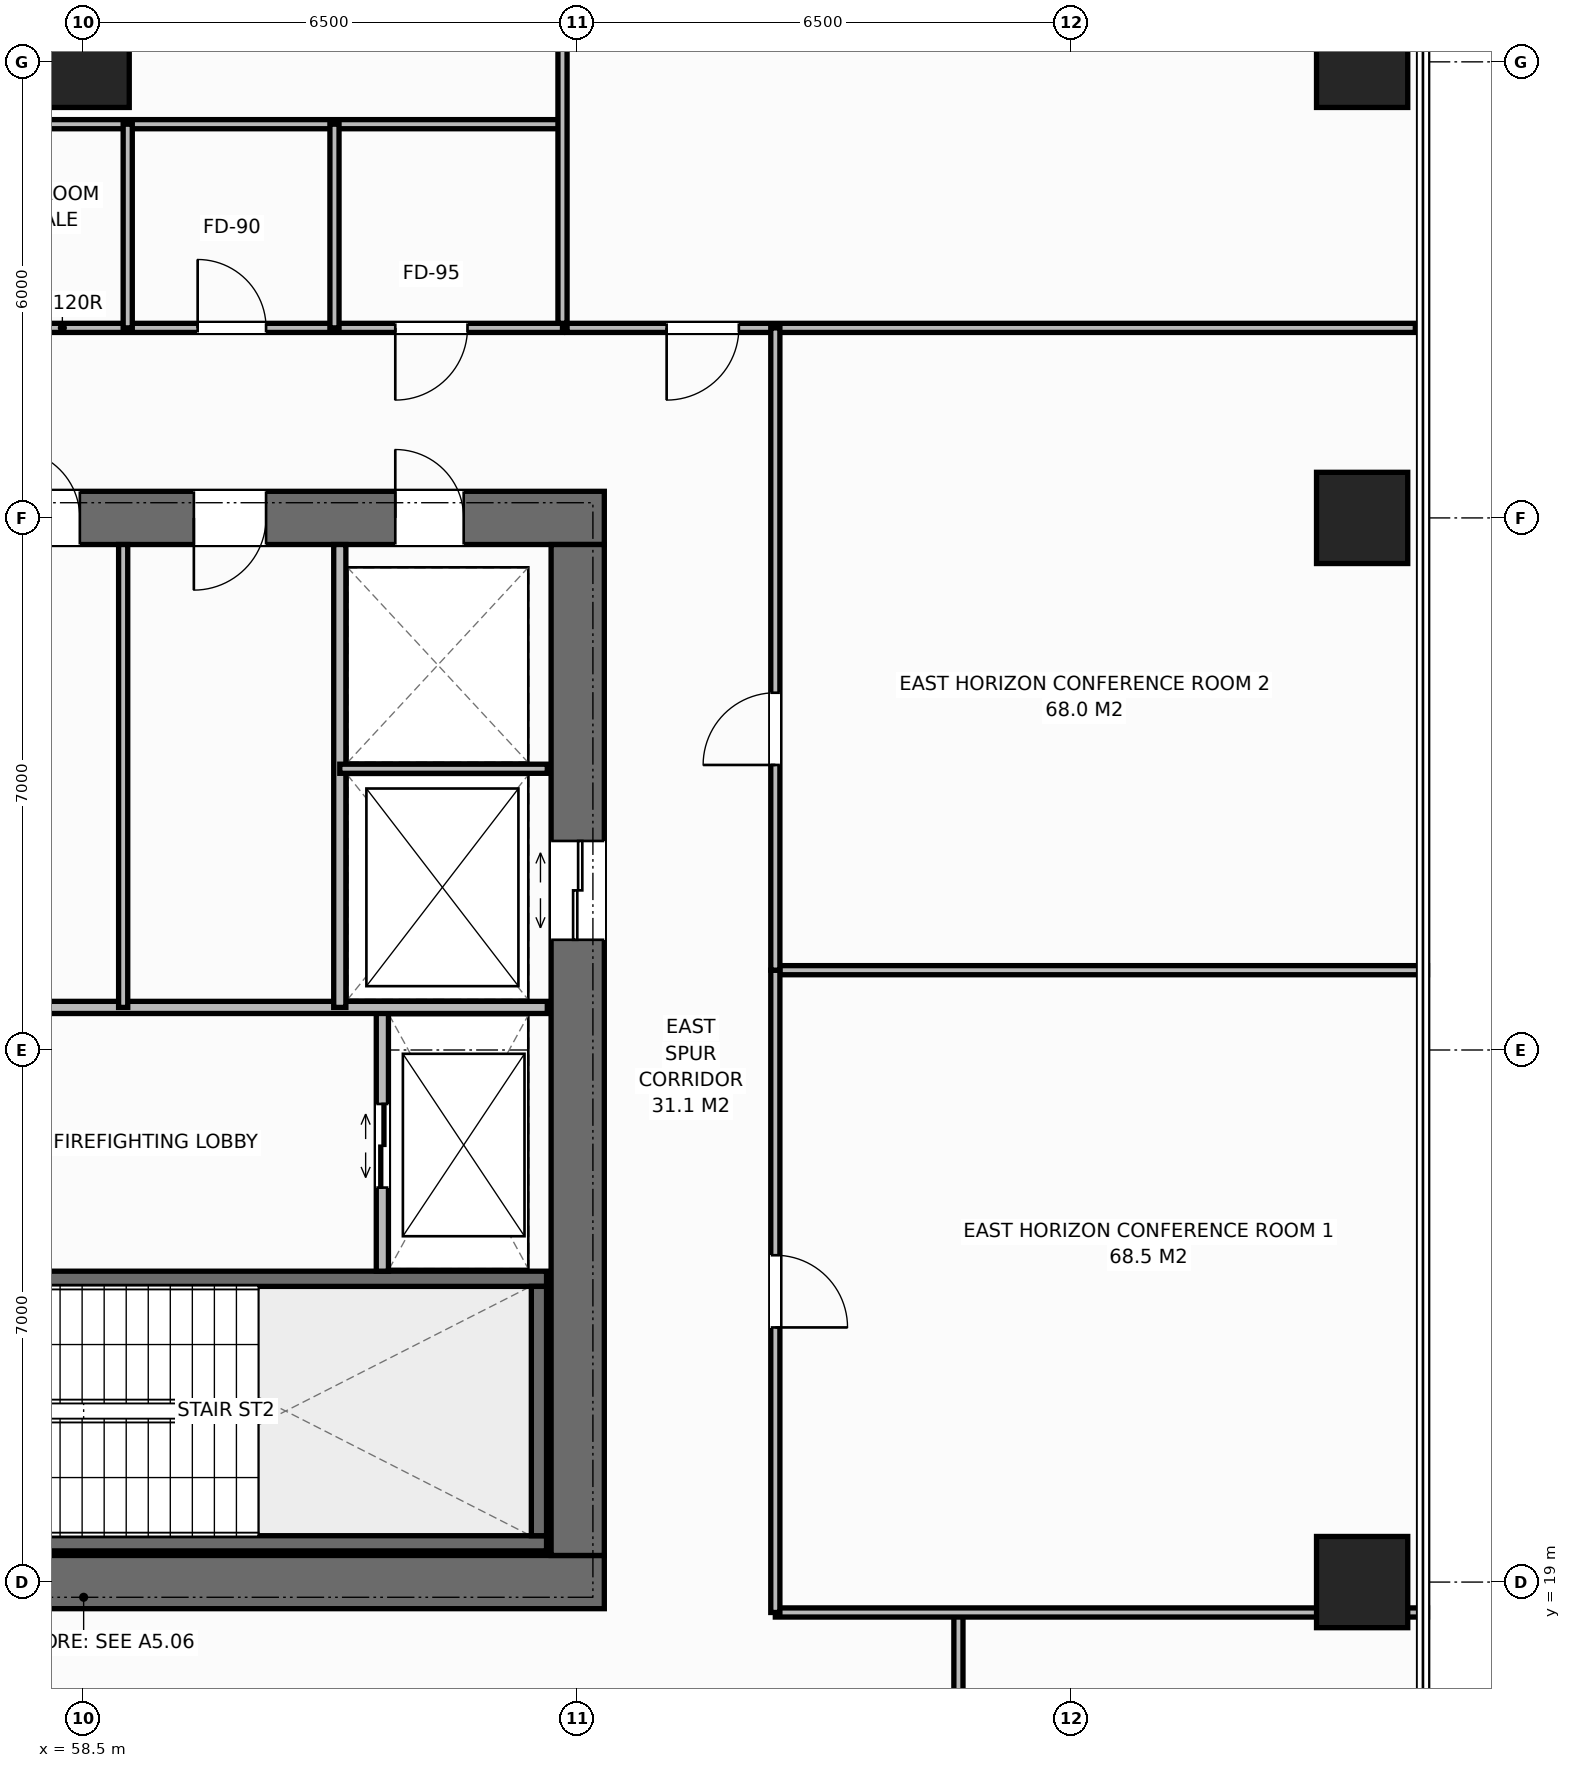
"""IFC4 building model, lengths in metres.
Left out: names, types, materials, properties, quantities, classifications, styles, units other than length and angle.
Written with IfcOpenShell. Run it as: python <this file> out.ifc"""

import sys

from ifc_helpers import new_model, si_unit, direction, frame, frame_2d, origin, origin_2d, place, context, subcontext, project, spatial, rectangle, extrude, element, fill, save


model = new_model("IFC4")
c1 = context("Model", 3, precision=1e-05, world=origin(), true_north=direction((0.0, 1.0)))
c2 = subcontext(c1, "Body", "Model", "MODEL_VIEW")
j1 = project(units=[si_unit("LENGTHUNIT", "METRE"), si_unit("PLANEANGLEUNIT", "RADIAN")], contexts=[c1])
p1 = place(None, origin())
s1 = spatial("IfcSite", under=j1, at=p1, CompositionType="ELEMENT")
p2 = place(p1, origin())
s2 = spatial("IfcBuilding", under=s1, at=p2, CompositionType="ELEMENT")
p3 = place(p2, frame((0.0, 0.0, 135.4)))
s3 = spatial("IfcBuildingStorey", under=s2, at=p3, CompositionType="ELEMENT", Elevation=135.4)
p4 = place(p3, frame((51.65, 19.0, 0.0), z_axis=(0.0, 0.0, 1.0), x_axis=(1.0, 0.0, 0.0)))
e1 = element("IfcWall", 1, at=p4, inside=s3, PredefinedType="SHEAR", context=c2, shape_type="SweptSolid", body=[
    extrude(rectangle(XDim=13.7, YDim=0.7, at=frame_2d((6.85, 0.0))), origin(), (0.0, 0.0, 1.0), 3.8),
])
p5 = place(p4, frame((3.07, 0.0, 0.0)))
e2 = element("IfcOpeningElement", 2, at=p5, cuts=e1, PredefinedType="OPENING", context=c2, shape_type="SweptSolid", body=[
    extrude(rectangle(XDim=1.4, YDim=2.2, at=frame_2d((0.7, 1.1))), frame((0.0, 0.36, 0.0), z_axis=(0.0, -1.0, 0.0), x_axis=(1.0, 0.0, 0.0)), (0.0, 0.0, 1.0), 0.72),
])
p6 = place(p3, frame((51.65, 33.0, 0.0), z_axis=(0.0, 0.0, 1.0), x_axis=(1.0, 0.0, 0.0)))
e3 = element("IfcWall", 3, at=p6, inside=s3, PredefinedType="SHEAR", context=c2, shape_type="SweptSolid", body=[
    extrude(rectangle(XDim=13.7, YDim=0.7, at=frame_2d((6.85, 0.0))), origin(), (0.0, 0.0, 1.0), 3.8),
])
p7 = place(p6, frame((3.07, 0.0, 0.0)))
e4 = element("IfcOpeningElement", 4, at=p7, cuts=e3, PredefinedType="OPENING", context=c2, shape_type="SweptSolid", body=[
    extrude(rectangle(XDim=1.4, YDim=2.2, at=frame_2d((0.7, 1.1))), frame((0.0, 0.36, 0.0), z_axis=(0.0, -1.0, 0.0), x_axis=(1.0, 0.0, 0.0)), (0.0, 0.0, 1.0), 0.72),
])
p8 = place(p6, frame((10.95, 0.0, 0.0)))
e5 = element("IfcOpeningElement", 5, at=p8, cuts=e3, PredefinedType="OPENING", context=c2, shape_type="SweptSolid", body=[
    extrude(rectangle(XDim=0.9, YDim=2.15, at=frame_2d((0.45, 1.075))), frame((0.0, 0.36, 0.0), z_axis=(0.0, -1.0, 0.0), x_axis=(1.0, 0.0, 0.0)), (0.0, 0.0, 1.0), 0.72),
])
p9 = place(p6, frame((5.9, 0.0, 0.0)))
e6 = element("IfcOpeningElement", 6, at=p9, cuts=e3, PredefinedType="OPENING", context=c2, shape_type="SweptSolid", body=[
    extrude(rectangle(XDim=0.9, YDim=2.15, at=frame_2d((0.45, 1.075))), frame((0.0, 0.36, 0.0), z_axis=(0.0, -1.0, 0.0), x_axis=(1.0, 0.0, 0.0)), (0.0, 0.0, 1.0), 0.72),
])
p10 = place(p6, frame((8.3, 0.0, 0.0)))
e7 = element("IfcOpeningElement", 7, at=p10, cuts=e3, PredefinedType="OPENING", context=c2, shape_type="SweptSolid", body=[
    extrude(rectangle(XDim=0.95, YDim=2.15, at=frame_2d((0.475, 1.075))), frame((0.0, 0.36, 0.0), z_axis=(0.0, -1.0, 0.0), x_axis=(1.0, 0.0, 0.0)), (0.0, 0.0, 1.0), 0.72),
])
p11 = place(p3, frame((65.0, 19.35, 0.0), z_axis=(0.0, 0.0, 1.0), x_axis=(0.0, 1.0, 0.0)))
e8 = element("IfcWall", 8, at=p11, inside=s3, PredefinedType="SHEAR", context=c2, shape_type="SweptSolid", body=[
    extrude(rectangle(XDim=13.3, YDim=0.7, at=frame_2d((6.65, 0.0))), origin(), (0.0, 0.0, 1.0), 3.8),
])
p12 = place(p11, frame((8.1, 0.0, 0.0)))
e9 = element("IfcOpeningElement", 9, at=p12, cuts=e8, PredefinedType="OPENING", context=c2, shape_type="SweptSolid", body=[
    extrude(rectangle(XDim=1.3, YDim=2.2, at=frame_2d((0.65, 1.1))), frame((0.0, 0.36, 0.0), z_axis=(0.0, -1.0, 0.0), x_axis=(1.0, 0.0, 0.0)), (0.0, 0.0, 1.0), 0.72),
])
p13 = place(p3, frame((56.16, 19.51, 0.0), z_axis=(0.0, 0.0, 1.0), x_axis=(1.0, 0.0, 0.0)))
e10 = element("IfcWall", 10, at=p13, inside=s3, PredefinedType="SHEAR", context=c2, shape_type="SweptSolid", body=[
    extrude(rectangle(XDim=8.43, YDim=0.2, at=frame_2d((4.215, 0.0))), origin(), (0.0, 0.0, 1.0), 3.8),
])
p14 = place(p3, frame((56.16, 22.99, 0.0), z_axis=(0.0, 0.0, 1.0), x_axis=(1.0, 0.0, 0.0)))
e11 = element("IfcWall", 11, at=p14, inside=s3, PredefinedType="SHEAR", context=c2, shape_type="SweptSolid", body=[
    extrude(rectangle(XDim=8.43, YDim=0.2, at=frame_2d((4.215, 0.0))), origin(), (0.0, 0.0, 1.0), 3.8),
])
p15 = place(p14, frame((0.45, 0.0, 0.0)))
e12 = element("IfcOpeningElement", 12, at=p15, cuts=e11, PredefinedType="OPENING", context=c2, shape_type="SweptSolid", body=[
    extrude(rectangle(XDim=1.0, YDim=2.15, at=frame_2d((0.5, 1.075))), frame((0.0, 0.11, 0.0), z_axis=(0.0, -1.0, 0.0), x_axis=(1.0, 0.0, 0.0)), (0.0, 0.0, 1.0), 0.22),
])
p16 = place(p3, frame((64.49, 19.61, 0.0), z_axis=(0.0, 0.0, 1.0), x_axis=(0.0, 1.0, 0.0)))
e13 = element("IfcWall", 13, at=p16, inside=s3, PredefinedType="SHEAR", context=c2, shape_type="SweptSolid", body=[
    extrude(rectangle(XDim=3.28, YDim=0.2, at=frame_2d((1.64, 0.0))), origin(), (0.0, 0.0, 1.0), 3.8),
])
for number, where, z_axis, x_axis in (
    (14, (58.5, 39.0, 0.0), (0.0, 0.0, 1.0), (1.0, 0.0, 0.0)),
    (15, (75.32, 19.0, 0.0), (0.0, 0.0, 1.0), (1.0, 0.0, 0.0)),
    (16, (75.32, 33.0, 0.0), (0.0, 0.0, 1.0), (1.0, 0.0, 0.0)),
    (17, (75.32, 39.0, 0.0), (0.0, 0.0, 1.0), (1.0, 0.0, 0.0)),
):
    element("IfcColumn", number, at=place(p3, frame(where, z_axis=z_axis, x_axis=x_axis)), inside=s3, PredefinedType="COLUMN", context=c2, shape_type="SweptSolid", body=[
        extrude(rectangle(XDim=1.2, YDim=1.2, at=origin_2d()), origin(), (0.0, 0.0, 1.0), 3.8),
    ])
p17 = place(p3, frame((62.43, 23.09, 0.0), z_axis=(0.0, 0.0, 1.0), x_axis=(0.0, 1.0, 0.0)))
e18 = element("IfcWall", 18, at=p17, inside=s3, PredefinedType="STANDARD", context=c2, shape_type="SweptSolid", body=[
    extrude(rectangle(XDim=3.47, YDim=0.16, at=frame_2d((1.735, 0.0))), origin(), (0.0, 0.0, 1.0), 3.52),
])
p18 = place(p17, frame((1.1, 0.0, 0.0)))
e19 = element("IfcOpeningElement", 19, at=p18, cuts=e18, PredefinedType="OPENING", context=c2, shape_type="SweptSolid", body=[
    extrude(rectangle(XDim=1.1, YDim=2.2, at=frame_2d((0.55, 1.1))), frame((0.0, 0.09, 0.0), z_axis=(0.0, -1.0, 0.0), x_axis=(1.0, 0.0, 0.0)), (0.0, 0.0, 1.0), 0.18),
])
p19 = place(p3, frame((56.26, 26.56, 0.0), z_axis=(0.0, 0.0, 1.0), x_axis=(1.0, 0.0, 0.0)))
e20 = element("IfcWall", 20, at=p19, inside=s3, PredefinedType="STANDARD", context=c2, shape_type="SweptSolid", body=[
    extrude(rectangle(XDim=8.34, YDim=0.16, at=frame_2d((4.17, 0.0))), origin(), (0.0, 0.0, 1.0), 3.52),
])
p20 = place(p3, frame((61.87, 26.56, 0.0), z_axis=(0.0, 0.0, 1.0), x_axis=(0.0, 1.0, 0.0)))
e21 = element("IfcWall", 21, at=p20, inside=s3, PredefinedType="STANDARD", context=c2, shape_type="SweptSolid", body=[
    extrude(rectangle(XDim=6.09, YDim=0.16, at=frame_2d((3.045, 0.0))), origin(), (0.0, 0.0, 1.0), 3.52),
])
p21 = place(p3, frame((61.87, 29.7, 0.0), z_axis=(0.0, 0.0, 1.0), x_axis=(1.0, 0.0, 0.0)))
e22 = element("IfcWall", 22, at=p21, inside=s3, PredefinedType="PARTITIONING", context=c2, shape_type="SweptSolid", body=[
    extrude(rectangle(XDim=2.73, YDim=0.12, at=frame_2d((1.365, 0.0))), origin(), (0.0, 0.0, 1.0), 3.52),
])
p22 = place(p3, frame((59.02, 26.56, 0.0), z_axis=(0.0, 0.0, 1.0), x_axis=(0.0, 1.0, 0.0)))
e23 = element("IfcWall", 23, at=p22, inside=s3, PredefinedType="PARTITIONING", context=c2, shape_type="SweptSolid", body=[
    extrude(rectangle(XDim=6.09, YDim=0.12, at=frame_2d((3.045, 0.0))), origin(), (0.0, 0.0, 1.0), 3.52),
])
p23 = place(p3, frame((70.009, 16.5, 0.0), z_axis=(0.0, 0.0, 1.0), x_axis=(0.0, 1.0, 0.0)))
e24 = element("IfcWall", 24, at=p23, inside=s3, PredefinedType="PARTITIONING", context=c2, shape_type="SweptSolid", body=[
    extrude(rectangle(XDim=2.1, YDim=0.12, at=frame_2d((1.05, 0.0))), origin(), (0.0, 0.0, 1.0), 3.52),
])
p24 = place(p3, frame((51.64, 35.5, 0.0), z_axis=(0.0, 0.0, 1.0), x_axis=(1.0, 0.0, 0.0)))
e25 = element("IfcWall", 25, at=p24, inside=s3, PredefinedType="PARTITIONING", context=c2, shape_type="SweptSolid", body=[
    extrude(rectangle(XDim=13.16, YDim=0.12, at=frame_2d((6.58, 0.0))), origin(), (0.0, 0.0, 1.0), 3.52),
])
p25 = place(p24, frame((1.51, 0.0, 0.0)))
e26 = element("IfcOpeningElement", 26, at=p25, cuts=e25, PredefinedType="OPENING", context=c2, shape_type="SweptSolid", body=[
    extrude(rectangle(XDim=0.9, YDim=2.15, at=frame_2d((0.45, 1.075))), frame((0.0, 0.07, 0.0), z_axis=(0.0, -1.0, 0.0), x_axis=(1.0, 0.0, 0.0)), (0.0, 0.0, 1.0), 0.14),
])
p26 = place(p24, frame((4.51, 0.0, 0.0)))
e27 = element("IfcOpeningElement", 27, at=p26, cuts=e25, PredefinedType="OPENING", context=c2, shape_type="SweptSolid", body=[
    extrude(rectangle(XDim=0.9, YDim=2.15, at=frame_2d((0.45, 1.075))), frame((0.0, 0.07, 0.0), z_axis=(0.0, -1.0, 0.0), x_axis=(1.0, 0.0, 0.0)), (0.0, 0.0, 1.0), 0.14),
])
p27 = place(p24, frame((8.36, 0.0, 0.0)))
e28 = element("IfcOpeningElement", 28, at=p27, cuts=e25, PredefinedType="OPENING", context=c2, shape_type="SweptSolid", body=[
    extrude(rectangle(XDim=0.9, YDim=2.15, at=frame_2d((0.45, 1.075))), frame((0.0, 0.07, 0.0), z_axis=(0.0, -1.0, 0.0), x_axis=(1.0, 0.0, 0.0)), (0.0, 0.0, 1.0), 0.14),
])
p28 = place(p24, frame((10.96, 0.0, 0.0)))
e29 = element("IfcOpeningElement", 29, at=p28, cuts=e25, PredefinedType="OPENING", context=c2, shape_type="SweptSolid", body=[
    extrude(rectangle(XDim=0.95, YDim=2.15, at=frame_2d((0.475, 1.075))), frame((0.0, 0.07, 0.0), z_axis=(0.0, -1.0, 0.0), x_axis=(1.0, 0.0, 0.0)), (0.0, 0.0, 1.0), 0.14),
])
p29 = place(p3, frame((51.64, 38.18, 0.0), z_axis=(0.0, 0.0, 1.0), x_axis=(1.0, 0.0, 0.0)))
e30 = element("IfcWall", 30, at=p29, inside=s3, PredefinedType="PARTITIONING", context=c2, shape_type="SweptSolid", body=[
    extrude(rectangle(XDim=13.16, YDim=0.12, at=frame_2d((6.58, 0.0))), origin(), (0.0, 0.0, 1.0), 3.52),
])
for number, where, z_axis, x_axis in (
    (31, (59.08, 35.5, 0.0), (0.0, 0.0, 1.0), (0.0, 1.0, 0.0)),
    (32, (61.8, 35.5, 0.0), (0.0, 0.0, 1.0), (0.0, 1.0, 0.0)),
):
    element("IfcWall", number, at=place(p3, frame(where, z_axis=z_axis, x_axis=x_axis)), inside=s3, PredefinedType="PARTITIONING", context=c2, shape_type="SweptSolid", body=[
        extrude(rectangle(XDim=2.68, YDim=0.12, at=frame_2d((1.34, 0.0))), origin(), (0.0, 0.0, 1.0), 3.52),
    ])
p30 = place(p3, frame((64.8, 35.56, 0.0), z_axis=(0.0, 0.0, 1.0), x_axis=(0.0, 1.0, 0.0)))
e33 = element("IfcWall", 33, at=p30, inside=s3, PredefinedType="PARTITIONING", context=c2, shape_type="SweptSolid", body=[
    extrude(rectangle(XDim=14.72, YDim=0.12, at=frame_2d((7.36, 0.0))), origin(), (0.0, 0.0, 1.0), 2.72),
])
p31 = place(p3, frame((64.86, 35.5, 0.0), z_axis=(0.0, 0.0, 1.0), x_axis=(1.0, 0.0, 0.0)))
e34 = element("IfcWall", 34, at=p31, inside=s3, PredefinedType="PARTITIONING", context=c2, shape_type="SweptSolid", body=[
    extrude(rectangle(XDim=11.16, YDim=0.12, at=frame_2d((5.58, 0.0))), origin(), (0.0, 0.0, 1.0), 3.52),
])
p32 = place(p31, frame((1.31, 0.0, 0.0)))
e35 = element("IfcOpeningElement", 35, at=p32, cuts=e34, PredefinedType="OPENING", context=c2, shape_type="SweptSolid", body=[
    extrude(rectangle(XDim=0.95, YDim=2.15, at=frame_2d((0.475, 1.075))), frame((0.0, 0.07, 0.0), z_axis=(0.0, -1.0, 0.0), x_axis=(1.0, 0.0, 0.0)), (0.0, 0.0, 1.0), 0.14),
])
for number, where, z_axis, x_axis in (
    (36, (67.6, 18.6, 0.0), (0.0, 0.0, 1.0), (1.0, 0.0, 0.0)),
    (37, (67.6, 27.05, 0.0), (0.0, 0.0, 1.0), (1.0, 0.0, 0.0)),
):
    element("IfcWall", number, at=place(p3, frame(where, z_axis=z_axis, x_axis=x_axis)), inside=s3, PredefinedType="PARTITIONING", context=c2, shape_type="SweptSolid", body=[
        extrude(rectangle(XDim=8.58, YDim=0.12, at=frame_2d((4.29, 0.0))), origin(), (0.0, 0.0, 1.0), 3.52),
    ])
p33 = place(p3, frame((67.6, 18.6, 0.0), z_axis=(0.0, 0.0, 1.0), x_axis=(0.0, 1.0, 0.0)))
e38 = element("IfcWall", 38, at=p33, inside=s3, PredefinedType="PARTITIONING", context=c2, shape_type="SweptSolid", body=[
    extrude(rectangle(XDim=8.45, YDim=0.12, at=frame_2d((4.225, 0.0))), origin(), (0.0, 0.0, 1.0), 3.52),
])
p34 = place(p33, frame((3.75, 0.0, 0.0)))
e39 = element("IfcOpeningElement", 39, at=p34, cuts=e38, PredefinedType="OPENING", context=c2, shape_type="SweptSolid", body=[
    extrude(rectangle(XDim=0.95, YDim=2.15, at=frame_2d((0.475, 1.075))), frame((0.0, 0.07, 0.0), z_axis=(0.0, -1.0, 0.0), x_axis=(1.0, 0.0, 0.0)), (0.0, 0.0, 1.0), 0.14),
])
p35 = place(p3, frame((67.6, 27.05, 0.0), z_axis=(0.0, 0.0, 1.0), x_axis=(0.0, 1.0, 0.0)))
e40 = element("IfcWall", 40, at=p35, inside=s3, PredefinedType="PARTITIONING", context=c2, shape_type="SweptSolid", body=[
    extrude(rectangle(XDim=8.45, YDim=0.12, at=frame_2d((4.225, 0.0))), origin(), (0.0, 0.0, 1.0), 3.52),
])
p36 = place(p35, frame((2.7, 0.0, 0.0)))
e41 = element("IfcOpeningElement", 41, at=p36, cuts=e40, PredefinedType="OPENING", context=c2, shape_type="SweptSolid", body=[
    extrude(rectangle(XDim=0.95, YDim=2.15, at=frame_2d((0.475, 1.075))), frame((0.0, 0.07, 0.0), z_axis=(0.0, -1.0, 0.0), x_axis=(1.0, 0.0, 0.0)), (0.0, 0.0, 1.0), 0.14),
])
p37 = place(p18, origin())
e42 = element("IfcDoor", 42, at=p37, inside=s3, OperationType="DOUBLE_DOOR_SLIDING", PredefinedType="DOOR", context=c2, shape_type="SweptSolid", body=[
    extrude(rectangle(XDim=1.1, YDim=2.2, at=frame_2d((0.55, 1.1))), frame((0.0, 0.025, 0.0), z_axis=(0.0, -1.0, 0.0), x_axis=(1.0, 0.0, 0.0)), (0.0, 0.0, 1.0), 0.05),
])
fill(e19, e42)
p38 = place(p12, origin())
e43 = element("IfcDoor", 43, at=p38, inside=s3, OperationType="DOUBLE_DOOR_SLIDING", PredefinedType="DOOR", context=c2, shape_type="SweptSolid", body=[
    extrude(rectangle(XDim=1.3, YDim=2.2, at=frame_2d((0.65, 1.1))), frame((0.0, 0.025, 0.0), z_axis=(0.0, -1.0, 0.0), x_axis=(1.0, 0.0, 0.0)), (0.0, 0.0, 1.0), 0.05),
])
fill(e9, e43)
p39 = place(p8, origin())
e44 = element("IfcDoor", 44, at=p39, inside=s3, OperationType="SINGLE_SWING_LEFT", PredefinedType="DOOR", context=c2, shape_type="SweptSolid", body=[
    extrude(rectangle(XDim=0.9, YDim=2.15, at=frame_2d((0.45, 1.075))), frame((0.0, -0.075, 0.0), z_axis=(0.0, -1.0, 0.0), x_axis=(1.0, 0.0, 0.0)), (0.0, 0.0, 1.0), 0.05),
])
fill(e5, e44)
p40 = place(p9, origin())
e45 = element("IfcDoor", 45, at=p40, inside=s3, OperationType="SINGLE_SWING_LEFT", PredefinedType="DOOR", context=c2, shape_type="SweptSolid", body=[
    extrude(rectangle(XDim=0.9, YDim=2.15, at=frame_2d((0.45, 1.075))), frame((0.0, -0.075, 0.0), z_axis=(0.0, -1.0, 0.0), x_axis=(1.0, 0.0, 0.0)), (0.0, 0.0, 1.0), 0.05),
])
fill(e6, e45)
p41 = place(p10, origin())
e46 = element("IfcDoor", 46, at=p41, inside=s3, OperationType="SINGLE_SWING_RIGHT", PredefinedType="DOOR", context=c2, shape_type="SweptSolid", body=[
    extrude(rectangle(XDim=0.95, YDim=2.15, at=frame_2d((0.475, 1.075))), frame((0.0, -0.075, 0.0), z_axis=(0.0, -1.0, 0.0), x_axis=(1.0, 0.0, 0.0)), (0.0, 0.0, 1.0), 0.05),
])
fill(e7, e46)
p42 = place(p27, origin())
e47 = element("IfcDoor", 47, at=p42, inside=s3, OperationType="SINGLE_SWING_LEFT", PredefinedType="DOOR", context=c2, shape_type="SweptSolid", body=[
    extrude(rectangle(XDim=0.9, YDim=2.15, at=frame_2d((0.45, 1.075))), frame((0.0, 0.025, 0.0), z_axis=(0.0, -1.0, 0.0), x_axis=(1.0, 0.0, 0.0)), (0.0, 0.0, 1.0), 0.05),
])
fill(e28, e47)
p43 = place(p28, origin())
e48 = element("IfcDoor", 48, at=p43, inside=s3, OperationType="SINGLE_SWING_RIGHT", PredefinedType="DOOR", context=c2, shape_type="SweptSolid", body=[
    extrude(rectangle(XDim=0.95, YDim=2.15, at=frame_2d((0.475, 1.075))), frame((0.0, 0.025, 0.0), z_axis=(0.0, -1.0, 0.0), x_axis=(1.0, 0.0, 0.0)), (0.0, 0.0, 1.0), 0.05),
])
fill(e29, e48)
p44 = place(p32, origin())
e49 = element("IfcDoor", 49, at=p44, inside=s3, OperationType="SINGLE_SWING_RIGHT", PredefinedType="DOOR", context=c2, shape_type="SweptSolid", body=[
    extrude(rectangle(XDim=0.95, YDim=2.15, at=frame_2d((0.475, 1.075))), frame((0.0, 0.025, 0.0), z_axis=(0.0, -1.0, 0.0), x_axis=(1.0, 0.0, 0.0)), (0.0, 0.0, 1.0), 0.05),
])
fill(e35, e49)
p45 = place(p34, origin())
e50 = element("IfcDoor", 50, at=p45, inside=s3, OperationType="SINGLE_SWING_RIGHT", PredefinedType="DOOR", context=c2, shape_type="SweptSolid", body=[
    extrude(rectangle(XDim=0.95, YDim=2.15, at=frame_2d((0.475, 1.075))), frame((0.0, 0.025, 0.0), z_axis=(0.0, -1.0, 0.0), x_axis=(1.0, 0.0, 0.0)), (0.0, 0.0, 1.0), 0.05),
])
fill(e39, e50)
p46 = place(p36, origin())
e51 = element("IfcDoor", 51, at=p46, inside=s3, OperationType="SINGLE_SWING_LEFT", PredefinedType="DOOR", context=c2, shape_type="SweptSolid", body=[
    extrude(rectangle(XDim=0.95, YDim=2.15, at=frame_2d((0.475, 1.075))), frame((0.0, 0.025, 0.0), z_axis=(0.0, -1.0, 0.0), x_axis=(1.0, 0.0, 0.0)), (0.0, 0.0, 1.0), 0.05),
])
fill(e41, e51)
save(model, sys.argv[1])
